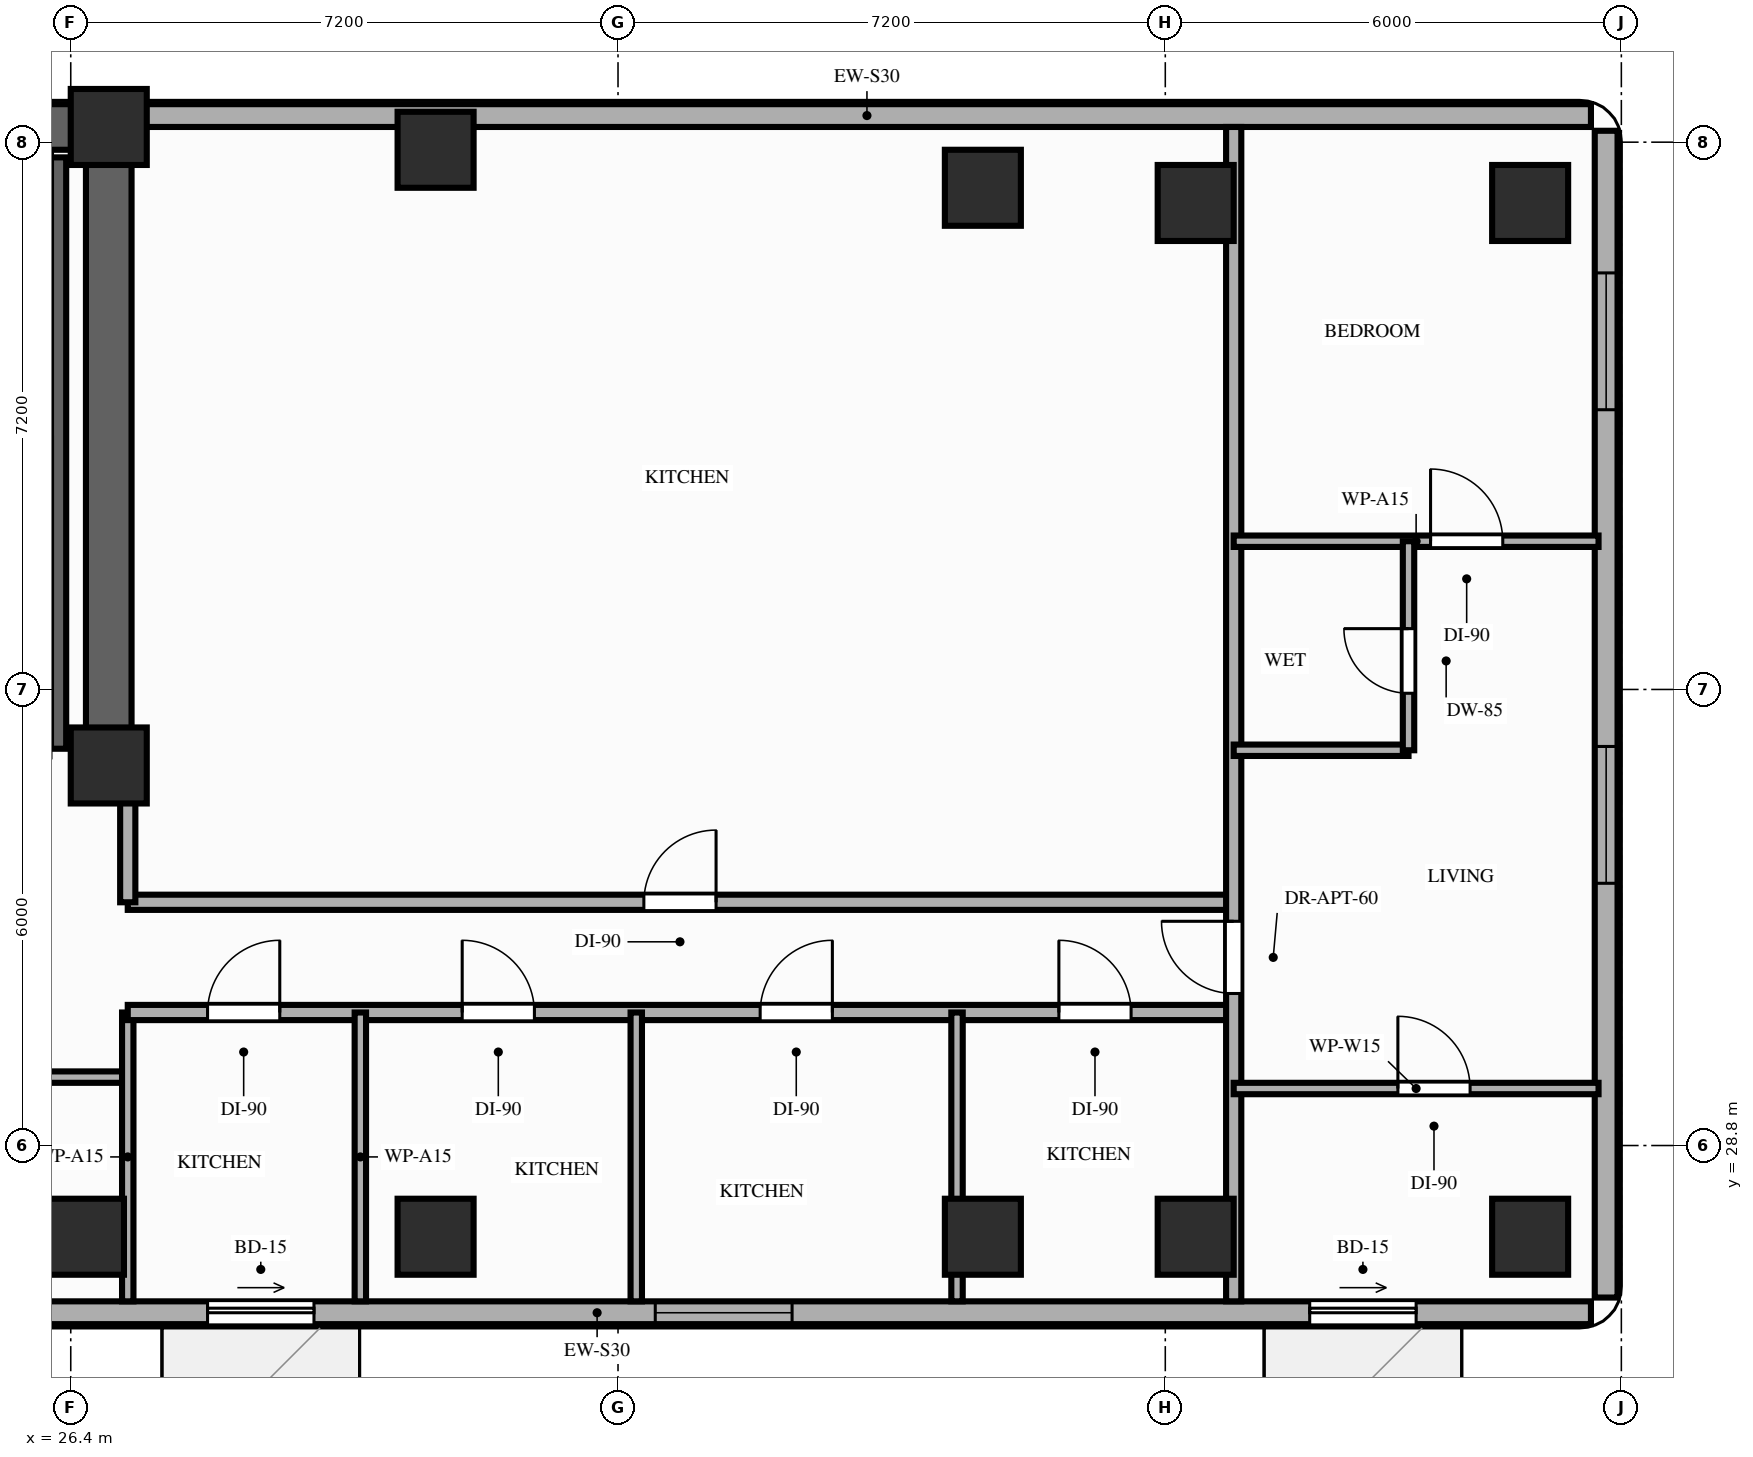
"""IFC4 building model, lengths in metres.
Left out: names, types, materials, properties, quantities, classifications, styles, units other than length and angle.
Written with IfcOpenShell. Run it as: python <this file> out.ifc"""

import sys

from ifc_helpers import new_model, si_unit, direction, frame, frame_2d, origin, origin_2d, place, context, subcontext, project, spatial, rectangle, extrude, element, fill, save


model = new_model("IFC4")
c1 = context("Model", 3, precision=1e-05, world=origin(), true_north=direction((0.0, 1.0)))
c2 = subcontext(c1, "Body", "Model", "MODEL_VIEW")
j1 = project(units=[si_unit("LENGTHUNIT", "METRE"), si_unit("PLANEANGLEUNIT", "RADIAN")], contexts=[c1])
p1 = place(None, origin())
s1 = spatial("IfcSite", under=j1, at=p1, CompositionType="ELEMENT")
p2 = place(p1, origin())
s2 = spatial("IfcBuilding", under=s1, at=p2, CompositionType="ELEMENT")
p3 = place(p2, frame((0.0, 0.0, 139.4)))
s3 = spatial("IfcBuildingStorey", under=s2, at=p3, CompositionType="ELEMENT", Elevation=139.4)
for number, where, z_axis, x_axis in (
    (1, (26.9, 33.8, 0.0), (0.0, 0.0, 1.0), (1.0, 0.0, 0.0)),
    (2, (26.9, 42.2, 0.0), (0.0, 0.0, 1.0), (1.0, 0.0, 0.0)),
    (3, (26.6, 27.6, 0.0), (0.0, 0.0, 1.0), (1.0, 0.0, 0.0)),
    (4, (31.2, 27.6, 0.0), (0.0, 0.0, 1.0), (1.0, 0.0, 0.0)),
    (5, (31.2, 41.9, 0.0), (0.0, 0.0, 1.0), (1.0, 0.0, 0.0)),
    (6, (38.4, 27.6, 0.0), (0.0, 0.0, 1.0), (1.0, 0.0, 0.0)),
    (7, (38.4, 41.4, 0.0), (0.0, 0.0, 1.0), (1.0, 0.0, 0.0)),
    (8, (41.2, 27.6, 0.0), (0.0, 0.0, 1.0), (1.0, 0.0, 0.0)),
    (9, (41.2, 41.2, 0.0), (0.0, 0.0, 1.0), (1.0, 0.0, 0.0)),
    (10, (45.6, 27.6, 0.0), (0.0, 0.0, 1.0), (1.0, 0.0, 0.0)),
    (11, (45.6, 41.2, 0.0), (0.0, 0.0, 1.0), (1.0, 0.0, 0.0)),
):
    element("IfcColumn", number, at=place(p3, frame(where, z_axis=z_axis, x_axis=x_axis)), inside=s3, PredefinedType="COLUMN", context=c2, shape_type="SweptSolid", body=[
        extrude(rectangle(XDim=1.0, YDim=1.0, at=origin_2d()), origin(), (0.0, 0.0, 1.0), 3.2),
    ])
p4 = place(p3, frame((46.4, 42.35, 0.0), z_axis=(0.0, 0.0, 1.0), x_axis=(-1.0, 0.0, 0.0)))
e12 = element("IfcWall", 12, at=p4, inside=s3, PredefinedType="STANDARD", context=c2, shape_type="SweptSolid", body=[
    extrude(rectangle(XDim=19.05, YDim=0.3, at=frame_2d((9.525, 0.0))), origin(), (0.0, 0.0, 1.0), 2.45),
])
p5 = place(p3, frame((20.25, 26.6, 0.0), z_axis=(0.0, 0.0, 1.0), x_axis=(1.0, 0.0, 0.0)))
e13 = element("IfcWall", 13, at=p5, inside=s3, PredefinedType="STANDARD", context=c2, shape_type="SweptSolid", body=[
    extrude(rectangle(XDim=26.15, YDim=0.3, at=frame_2d((13.075, 0.0))), origin(), (0.0, 0.0, 1.0), 2.71),
])
p6 = place(p5, frame((7.95, 0.0, 0.0)))
e14 = element("IfcOpeningElement", 14, at=p6, cuts=e13, PredefinedType="OPENING", context=c2, shape_type="SweptSolid", body=[
    extrude(rectangle(XDim=1.4, YDim=2.1, at=frame_2d((0.7, 1.05))), frame((0.0, 0.16, 0.0), z_axis=(0.0, -1.0, 0.0), x_axis=(1.0, 0.0, 0.0)), (0.0, 0.0, 1.0), 0.32),
])
p7 = place(p5, frame((22.45, 0.0, 0.0)))
e15 = element("IfcOpeningElement", 15, at=p7, cuts=e13, PredefinedType="OPENING", context=c2, shape_type="SweptSolid", body=[
    extrude(rectangle(XDim=1.4, YDim=2.1, at=frame_2d((0.7, 1.05))), frame((0.0, 0.16, 0.0), z_axis=(0.0, -1.0, 0.0), x_axis=(1.0, 0.0, 0.0)), (0.0, 0.0, 1.0), 0.32),
])
p8 = place(p5, frame((2.25, 0.0, 0.85)))
e16 = element("IfcOpeningElement", 16, at=p8, cuts=e13, PredefinedType="OPENING", context=c2, shape_type="SweptSolid", body=[
    extrude(rectangle(XDim=1.8, YDim=1.61, at=frame_2d((0.9, 0.805))), frame((0.0, 0.16, 0.0), z_axis=(0.0, -1.0, 0.0), x_axis=(1.0, 0.0, 0.0)), (0.0, 0.0, 1.0), 0.32),
])
p9 = place(p5, frame((13.84, 0.0, 0.85)))
e17 = element("IfcOpeningElement", 17, at=p9, cuts=e13, PredefinedType="OPENING", context=c2, shape_type="SweptSolid", body=[
    extrude(rectangle(XDim=1.8, YDim=1.61, at=frame_2d((0.9, 0.805))), frame((0.0, 0.16, 0.0), z_axis=(0.0, -1.0, 0.0), x_axis=(1.0, 0.0, 0.0)), (0.0, 0.0, 1.0), 0.32),
])
p10 = place(p3, frame((46.6, 26.8, 0.0), z_axis=(0.0, 0.0, 1.0), x_axis=(0.0, 1.0, 0.0)))
e18 = element("IfcWall", 18, at=p10, inside=s3, PredefinedType="STANDARD", context=c2, shape_type="SweptSolid", body=[
    extrude(rectangle(XDim=15.35, YDim=0.3, at=frame_2d((7.675, 0.0))), origin(), (0.0, 0.0, 1.0), 3.02),
])
p11 = place(p10, frame((5.45, 0.0, 0.85)))
e19 = element("IfcOpeningElement", 19, at=p11, cuts=e18, PredefinedType="OPENING", context=c2, shape_type="SweptSolid", body=[
    extrude(rectangle(XDim=1.8, YDim=1.75, at=frame_2d((0.9, 0.875))), frame((0.0, 0.16, 0.0), z_axis=(0.0, -1.0, 0.0), x_axis=(1.0, 0.0, 0.0)), (0.0, 0.0, 1.0), 0.32),
])
p12 = place(p10, frame((11.68, 0.0, 0.85)))
e20 = element("IfcOpeningElement", 20, at=p12, cuts=e18, PredefinedType="OPENING", context=c2, shape_type="SweptSolid", body=[
    extrude(rectangle(XDim=1.8, YDim=1.75, at=frame_2d((0.9, 0.875))), frame((0.0, 0.16, 0.0), z_axis=(0.0, -1.0, 0.0), x_axis=(1.0, 0.0, 0.0)), (0.0, 0.0, 1.0), 0.32),
])
p13 = place(p3, frame((6.45, 42.2, 0.0), z_axis=(0.0, 0.0, 1.0), x_axis=(1.0, 0.0, 0.0)))
e21 = element("IfcWall", 21, at=p13, inside=s3, PredefinedType="SHEAR", context=c2, shape_type="SweptSolid", body=[
    extrude(rectangle(XDim=20.45, YDim=0.6, at=frame_2d((10.225, 0.0))), origin(), (0.0, 0.0, 1.0), 3.02),
])
p14 = place(p3, frame((26.9, 33.8, 0.0), z_axis=(0.0, 0.0, 1.0), x_axis=(0.0, 1.0, 0.0)))
e22 = element("IfcWall", 22, at=p14, inside=s3, PredefinedType="SHEAR", context=c2, shape_type="SweptSolid", body=[
    extrude(rectangle(XDim=7.95, YDim=0.6, at=frame_2d((3.975, 0.0))), origin(), (0.0, 0.0, 1.0), 3.02),
])
p15 = place(p3, frame((26.24, 34.02, 0.0), z_axis=(0.0, 0.0, 1.0), x_axis=(0.0, 1.0, 0.0)))
e23 = element("IfcWall", 23, at=p15, inside=s3, PredefinedType="SHEAR", context=c2, shape_type="SweptSolid", body=[
    extrude(rectangle(XDim=7.78, YDim=0.2, at=frame_2d((3.89, 0.0))), origin(), (0.0, 0.0, 1.0), 3.02),
])
p16 = place(p3, frame((20.45, 29.7, 0.0), z_axis=(0.0, 0.0, 1.0), x_axis=(1.0, 0.0, 0.0)))
e24 = element("IfcWall", 24, at=p16, inside=s3, PredefinedType="PARTITIONING", context=c2, shape_type="SweptSolid", body=[
    extrude(rectangle(XDim=6.7, YDim=0.15, at=frame_2d((3.35, 0.0))), origin(), (0.0, 0.0, 1.0), 3.02),
])
p17 = place(p16, frame((2.8, 0.0, 0.0)))
e25 = element("IfcOpeningElement", 25, at=p17, cuts=e24, PredefinedType="OPENING", context=c2, shape_type="SweptSolid", body=[
    extrude(rectangle(XDim=0.95, YDim=2.15, at=frame_2d((0.475, 1.075))), frame((0.0, 0.085, 0.0), z_axis=(0.0, -1.0, 0.0), x_axis=(1.0, 0.0, 0.0)), (0.0, 0.0, 1.0), 0.17),
])
p18 = place(p3, frame((27.15, 26.75, 0.0), z_axis=(0.0, 0.0, 1.0), x_axis=(0.0, 1.0, 0.0)))
e26 = element("IfcWall", 26, at=p18, inside=s3, PredefinedType="PARTITIONING", context=c2, shape_type="SweptSolid", body=[
    extrude(rectangle(XDim=3.8, YDim=0.15, at=frame_2d((1.9, 0.0))), origin(), (0.0, 0.0, 1.0), 2.45),
])
p19 = place(p3, frame((27.15, 30.55, 0.0), z_axis=(0.0, 0.0, 1.0), x_axis=(1.0, 0.0, 0.0)))
e27 = element("IfcWall", 27, at=p19, inside=s3, PredefinedType="PARTITIONING", context=c2, shape_type="SweptSolid", body=[
    extrude(rectangle(XDim=14.55, YDim=0.2, at=frame_2d((7.275, 0.0))), origin(), (0.0, 0.0, 1.0), 2.45),
])
p20 = place(p19, frame((1.05, 0.0, 0.0)))
e28 = element("IfcOpeningElement", 28, at=p20, cuts=e27, PredefinedType="OPENING", context=c2, shape_type="SweptSolid", body=[
    extrude(rectangle(XDim=0.95, YDim=2.15, at=frame_2d((0.475, 1.075))), frame((0.0, 0.11, 0.0), z_axis=(0.0, -1.0, 0.0), x_axis=(1.0, 0.0, 0.0)), (0.0, 0.0, 1.0), 0.22),
])
p21 = place(p19, frame((4.4, 0.0, 0.0)))
e29 = element("IfcOpeningElement", 29, at=p21, cuts=e27, PredefinedType="OPENING", context=c2, shape_type="SweptSolid", body=[
    extrude(rectangle(XDim=0.95, YDim=2.15, at=frame_2d((0.475, 1.075))), frame((0.0, 0.11, 0.0), z_axis=(0.0, -1.0, 0.0), x_axis=(1.0, 0.0, 0.0)), (0.0, 0.0, 1.0), 0.22),
])
p22 = place(p19, frame((8.32, 0.0, 0.0)))
e30 = element("IfcOpeningElement", 30, at=p22, cuts=e27, PredefinedType="OPENING", context=c2, shape_type="SweptSolid", body=[
    extrude(rectangle(XDim=0.95, YDim=2.15, at=frame_2d((0.475, 1.075))), frame((0.0, 0.11, 0.0), z_axis=(0.0, -1.0, 0.0), x_axis=(1.0, 0.0, 0.0)), (0.0, 0.0, 1.0), 0.22),
])
p23 = place(p19, frame((12.25, 0.0, 0.0)))
e31 = element("IfcOpeningElement", 31, at=p23, cuts=e27, PredefinedType="OPENING", context=c2, shape_type="SweptSolid", body=[
    extrude(rectangle(XDim=0.95, YDim=2.15, at=frame_2d((0.475, 1.075))), frame((0.0, 0.11, 0.0), z_axis=(0.0, -1.0, 0.0), x_axis=(1.0, 0.0, 0.0)), (0.0, 0.0, 1.0), 0.22),
])
p24 = place(p3, frame((27.15, 32.0, 0.0), z_axis=(0.0, 0.0, 1.0), x_axis=(1.0, 0.0, 0.0)))
e32 = element("IfcWall", 32, at=p24, inside=s3, PredefinedType="PARTITIONING", context=c2, shape_type="SweptSolid", body=[
    extrude(rectangle(XDim=14.55, YDim=0.2, at=frame_2d((7.275, 0.0))), origin(), (0.0, 0.0, 1.0), 2.45),
])
p25 = place(p24, frame((6.79, 0.0, 0.0)))
e33 = element("IfcOpeningElement", 33, at=p25, cuts=e32, PredefinedType="OPENING", context=c2, shape_type="SweptSolid", body=[
    extrude(rectangle(XDim=0.95, YDim=2.15, at=frame_2d((0.475, 1.075))), frame((0.0, 0.11, 0.0), z_axis=(0.0, -1.0, 0.0), x_axis=(1.0, 0.0, 0.0)), (0.0, 0.0, 1.0), 0.22),
])
p26 = place(p3, frame((27.15, 32.0, 0.0), z_axis=(0.0, 0.0, 1.0), x_axis=(0.0, 1.0, 0.0)))
e34 = element("IfcWall", 34, at=p26, inside=s3, PredefinedType="PARTITIONING", context=c2, shape_type="SweptSolid", body=[
    extrude(rectangle(XDim=1.68, YDim=0.2, at=frame_2d((0.84, 0.0))), origin(), (0.0, 0.0, 1.0), 2.45),
])
p27 = place(p3, frame((41.7, 26.75, 0.0), z_axis=(0.0, 0.0, 1.0), x_axis=(0.0, 1.0, 0.0)))
e35 = element("IfcWall", 35, at=p27, inside=s3, PredefinedType="PARTITIONING", context=c2, shape_type="SweptSolid", body=[
    extrude(rectangle(XDim=15.45, YDim=0.2, at=frame_2d((7.725, 0.0))), origin(), (0.0, 0.0, 1.0), 2.45),
])
p28 = place(p27, frame((4.05, 0.0, 0.0)))
e36 = element("IfcOpeningElement", 36, at=p28, cuts=e35, PredefinedType="OPENING", context=c2, shape_type="SweptSolid", body=[
    extrude(rectangle(XDim=0.95, YDim=2.15, at=frame_2d((0.475, 1.075))), frame((0.0, 0.11, 0.0), z_axis=(0.0, -1.0, 0.0), x_axis=(1.0, 0.0, 0.0)), (0.0, 0.0, 1.0), 0.22),
])
p29 = place(p3, frame((41.7, 29.55, 0.0), z_axis=(0.0, 0.0, 1.0), x_axis=(1.0, 0.0, 0.0)))
e37 = element("IfcWall", 37, at=p29, inside=s3, PredefinedType="PARTITIONING", context=c2, shape_type="SweptSolid", body=[
    extrude(rectangle(XDim=4.8, YDim=0.15, at=frame_2d((2.4, 0.0))), origin(), (0.0, 0.0, 1.0), 2.45),
])
p30 = place(p29, frame((2.16, 0.0, 0.0)))
e38 = element("IfcOpeningElement", 38, at=p30, cuts=e37, PredefinedType="OPENING", context=c2, shape_type="SweptSolid", body=[
    extrude(rectangle(XDim=0.95, YDim=2.15, at=frame_2d((0.475, 1.075))), frame((0.0, 0.085, 0.0), z_axis=(0.0, -1.0, 0.0), x_axis=(1.0, 0.0, 0.0)), (0.0, 0.0, 1.0), 0.17),
])
p31 = place(p3, frame((41.7, 36.75, 0.0), z_axis=(0.0, 0.0, 1.0), x_axis=(1.0, 0.0, 0.0)))
e39 = element("IfcWall", 39, at=p31, inside=s3, PredefinedType="PARTITIONING", context=c2, shape_type="SweptSolid", body=[
    extrude(rectangle(XDim=4.8, YDim=0.15, at=frame_2d((2.4, 0.0))), origin(), (0.0, 0.0, 1.0), 2.45),
])
p32 = place(p31, frame((2.59, 0.0, 0.0)))
e40 = element("IfcOpeningElement", 40, at=p32, cuts=e39, PredefinedType="OPENING", context=c2, shape_type="SweptSolid", body=[
    extrude(rectangle(XDim=0.95, YDim=2.15, at=frame_2d((0.475, 1.075))), frame((0.0, 0.085, 0.0), z_axis=(0.0, -1.0, 0.0), x_axis=(1.0, 0.0, 0.0)), (0.0, 0.0, 1.0), 0.17),
])
p33 = place(p3, frame((41.7, 34.0, 0.0), z_axis=(0.0, 0.0, 1.0), x_axis=(1.0, 0.0, 0.0)))
e41 = element("IfcWall", 41, at=p33, inside=s3, PredefinedType="PARTITIONING", context=c2, shape_type="SweptSolid", body=[
    extrude(rectangle(XDim=2.3, YDim=0.15, at=frame_2d((1.15, 0.0))), origin(), (0.0, 0.0, 1.0), 3.02),
])
p34 = place(p3, frame((44.0, 34.0, 0.0), z_axis=(0.0, 0.0, 1.0), x_axis=(0.0, 1.0, 0.0)))
e42 = element("IfcWall", 42, at=p34, inside=s3, PredefinedType="PARTITIONING", context=c2, shape_type="SweptSolid", body=[
    extrude(rectangle(XDim=2.75, YDim=0.15, at=frame_2d((1.375, 0.0))), origin(), (0.0, 0.0, 1.0), 2.61),
])
p35 = place(p34, frame((0.75, 0.0, 0.0)))
e43 = element("IfcOpeningElement", 43, at=p35, cuts=e42, PredefinedType="OPENING", context=c2, shape_type="SweptSolid", body=[
    extrude(rectangle(XDim=0.85, YDim=2.1, at=frame_2d((0.425, 1.05))), frame((0.0, 0.085, 0.0), z_axis=(0.0, -1.0, 0.0), x_axis=(1.0, 0.0, 0.0)), (0.0, 0.0, 1.0), 0.17),
])
for number, where, z_axis, x_axis in (
    (44, (30.21, 26.75, 0.0), (0.0, 0.0, 1.0), (0.0, 1.0, 0.0)),
    (45, (33.84, 26.75, 0.0), (0.0, 0.0, 1.0), (0.0, 1.0, 0.0)),
    (46, (38.06, 26.75, 0.0), (0.0, 0.0, 1.0), (0.0, 1.0, 0.0)),
):
    element("IfcWall", number, at=place(p3, frame(where, z_axis=z_axis, x_axis=x_axis)), inside=s3, PredefinedType="PARTITIONING", context=c2, shape_type="SweptSolid", body=[
        extrude(rectangle(XDim=3.8, YDim=0.15, at=frame_2d((1.9, 0.0))), origin(), (0.0, 0.0, 1.0), 2.45),
    ])
p36 = place(p6, origin())
e47 = element("IfcDoor", 47, at=p36, inside=s3, OperationType="SLIDING_TO_RIGHT", PredefinedType="DOOR", context=c2, shape_type="SweptSolid", body=[
    extrude(rectangle(XDim=1.4, YDim=2.1, at=frame_2d((0.7, 1.05))), frame((0.0, 0.025, 0.0), z_axis=(0.0, -1.0, 0.0), x_axis=(1.0, 0.0, 0.0)), (0.0, 0.0, 1.0), 0.05),
])
fill(e14, e47)
p37 = place(p7, origin())
e48 = element("IfcDoor", 48, at=p37, inside=s3, OperationType="SLIDING_TO_RIGHT", PredefinedType="DOOR", context=c2, shape_type="SweptSolid", body=[
    extrude(rectangle(XDim=1.4, YDim=2.1, at=frame_2d((0.7, 1.05))), frame((0.0, 0.025, 0.0), z_axis=(0.0, -1.0, 0.0), x_axis=(1.0, 0.0, 0.0)), (0.0, 0.0, 1.0), 0.05),
])
fill(e15, e48)
p38 = place(p11, origin())
e49 = element("IfcWindow", 49, at=p38, inside=s3, PartitioningType="SINGLE_PANEL", PredefinedType="WINDOW", context=c2, shape_type="SweptSolid", body=[
    extrude(rectangle(XDim=1.8, YDim=1.75, at=frame_2d((0.9, 0.875))), frame((0.0, 0.03, 0.0), z_axis=(0.0, -1.0, 0.0), x_axis=(1.0, 0.0, 0.0)), (0.0, 0.0, 1.0), 0.06),
])
fill(e19, e49)
p39 = place(p12, origin())
e50 = element("IfcWindow", 50, at=p39, inside=s3, PartitioningType="SINGLE_PANEL", PredefinedType="WINDOW", context=c2, shape_type="SweptSolid", body=[
    extrude(rectangle(XDim=1.8, YDim=1.75, at=frame_2d((0.9, 0.875))), frame((0.0, 0.03, 0.0), z_axis=(0.0, -1.0, 0.0), x_axis=(1.0, 0.0, 0.0)), (0.0, 0.0, 1.0), 0.06),
])
fill(e20, e50)
p40 = place(p9, origin())
e51 = element("IfcWindow", 51, at=p40, inside=s3, PartitioningType="SINGLE_PANEL", PredefinedType="WINDOW", context=c2, shape_type="SweptSolid", body=[
    extrude(rectangle(XDim=1.8, YDim=1.61, at=frame_2d((0.9, 0.805))), frame((0.0, 0.03, 0.0), z_axis=(0.0, -1.0, 0.0), x_axis=(1.0, 0.0, 0.0)), (0.0, 0.0, 1.0), 0.06),
])
fill(e17, e51)
p41 = place(p28, origin())
e52 = element("IfcDoor", 52, at=p41, inside=s3, OperationType="SINGLE_SWING_RIGHT", PredefinedType="DOOR", context=c2, shape_type="SweptSolid", body=[
    extrude(rectangle(XDim=0.95, YDim=2.15, at=frame_2d((0.475, 1.075))), frame((0.0, 0.025, 0.0), z_axis=(0.0, -1.0, 0.0), x_axis=(1.0, 0.0, 0.0)), (0.0, 0.0, 1.0), 0.05),
])
fill(e36, e52)
p42 = place(p32, origin())
e53 = element("IfcDoor", 53, at=p42, inside=s3, OperationType="SINGLE_SWING_LEFT", PredefinedType="DOOR", context=c2, shape_type="SweptSolid", body=[
    extrude(rectangle(XDim=0.95, YDim=2.15, at=frame_2d((0.475, 1.075))), frame((0.0, 0.025, 0.0), z_axis=(0.0, -1.0, 0.0), x_axis=(1.0, 0.0, 0.0)), (0.0, 0.0, 1.0), 0.05),
])
fill(e40, e53)
p43 = place(p35, origin())
e54 = element("IfcDoor", 54, at=p43, inside=s3, OperationType="SINGLE_SWING_RIGHT", PredefinedType="DOOR", context=c2, shape_type="SweptSolid", body=[
    extrude(rectangle(XDim=0.85, YDim=2.1, at=frame_2d((0.425, 1.05))), frame((0.0, 0.025, 0.0), z_axis=(0.0, -1.0, 0.0), x_axis=(1.0, 0.0, 0.0)), (0.0, 0.0, 1.0), 0.05),
])
fill(e43, e54)
p44 = place(p30, origin())
e55 = element("IfcDoor", 55, at=p44, inside=s3, OperationType="SINGLE_SWING_LEFT", PredefinedType="DOOR", context=c2, shape_type="SweptSolid", body=[
    extrude(rectangle(XDim=0.95, YDim=2.15, at=frame_2d((0.475, 1.075))), frame((0.0, 0.025, 0.0), z_axis=(0.0, -1.0, 0.0), x_axis=(1.0, 0.0, 0.0)), (0.0, 0.0, 1.0), 0.05),
])
fill(e38, e55)
p45 = place(p20, origin())
e56 = element("IfcDoor", 56, at=p45, inside=s3, OperationType="SINGLE_SWING_RIGHT", PredefinedType="DOOR", context=c2, shape_type="SweptSolid", body=[
    extrude(rectangle(XDim=0.95, YDim=2.15, at=frame_2d((0.475, 1.075))), frame((0.0, 0.025, 0.0), z_axis=(0.0, -1.0, 0.0), x_axis=(1.0, 0.0, 0.0)), (0.0, 0.0, 1.0), 0.05),
])
fill(e28, e56)
p46 = place(p21, origin())
e57 = element("IfcDoor", 57, at=p46, inside=s3, OperationType="SINGLE_SWING_LEFT", PredefinedType="DOOR", context=c2, shape_type="SweptSolid", body=[
    extrude(rectangle(XDim=0.95, YDim=2.15, at=frame_2d((0.475, 1.075))), frame((0.0, 0.025, 0.0), z_axis=(0.0, -1.0, 0.0), x_axis=(1.0, 0.0, 0.0)), (0.0, 0.0, 1.0), 0.05),
])
fill(e29, e57)
p47 = place(p22, origin())
e58 = element("IfcDoor", 58, at=p47, inside=s3, OperationType="SINGLE_SWING_RIGHT", PredefinedType="DOOR", context=c2, shape_type="SweptSolid", body=[
    extrude(rectangle(XDim=0.95, YDim=2.15, at=frame_2d((0.475, 1.075))), frame((0.0, 0.025, 0.0), z_axis=(0.0, -1.0, 0.0), x_axis=(1.0, 0.0, 0.0)), (0.0, 0.0, 1.0), 0.05),
])
fill(e30, e58)
p48 = place(p23, origin())
e59 = element("IfcDoor", 59, at=p48, inside=s3, OperationType="SINGLE_SWING_LEFT", PredefinedType="DOOR", context=c2, shape_type="SweptSolid", body=[
    extrude(rectangle(XDim=0.95, YDim=2.15, at=frame_2d((0.475, 1.075))), frame((0.0, 0.025, 0.0), z_axis=(0.0, -1.0, 0.0), x_axis=(1.0, 0.0, 0.0)), (0.0, 0.0, 1.0), 0.05),
])
fill(e31, e59)
p49 = place(p25, origin())
e60 = element("IfcDoor", 60, at=p49, inside=s3, OperationType="SINGLE_SWING_RIGHT", PredefinedType="DOOR", context=c2, shape_type="SweptSolid", body=[
    extrude(rectangle(XDim=0.95, YDim=2.15, at=frame_2d((0.475, 1.075))), frame((0.0, 0.025, 0.0), z_axis=(0.0, -1.0, 0.0), x_axis=(1.0, 0.0, 0.0)), (0.0, 0.0, 1.0), 0.05),
])
fill(e33, e60)
save(model, sys.argv[1])
